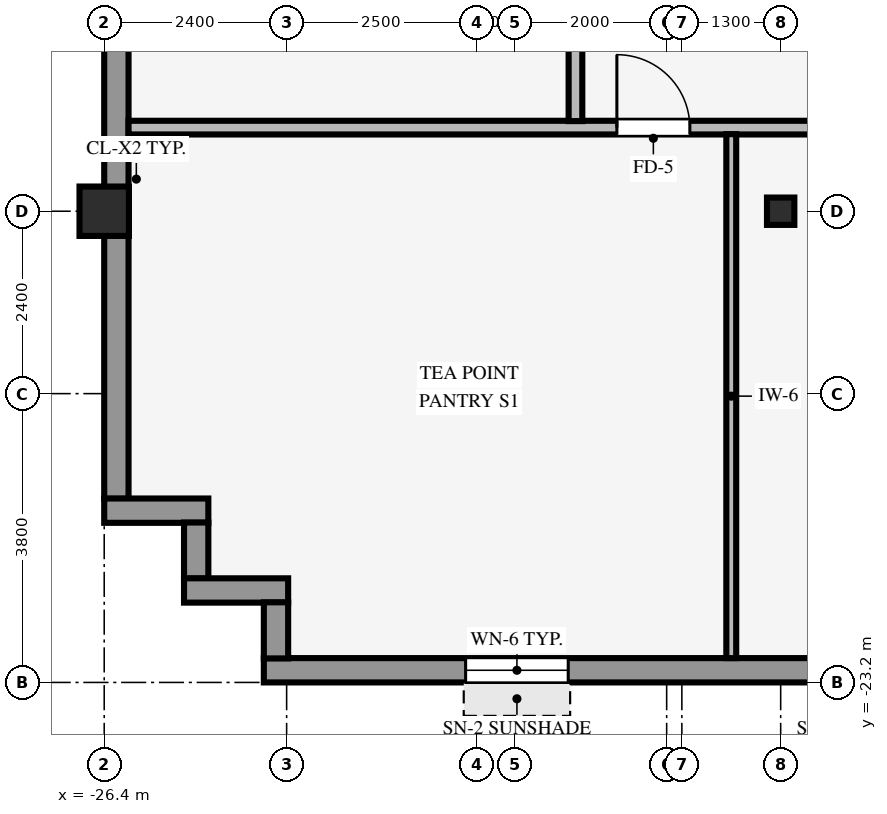
"""IFC4 building model, lengths in metres.
Left out: names, types, materials, properties, quantities, classifications, styles, units other than length and angle.
Written with IfcOpenShell. Run it as: python <this file> out.ifc"""

import sys

from ifc_helpers import new_model, si_unit, direction, frame, frame_2d, origin, origin_2d, place, context, subcontext, project, spatial, rectangle, hollow_rectangle, i_section, extrude, source, transform, mapped, element, fill, save


model = new_model("IFC4")
c1 = context("Model", 3, precision=1e-05, world=origin(), true_north=direction((0.0, 1.0)))
c2 = subcontext(c1, "Body", "Model", "MODEL_VIEW")
j1 = project(units=[si_unit("LENGTHUNIT", "METRE"), si_unit("PLANEANGLEUNIT", "RADIAN")], contexts=[c1])
p1 = place(None, origin())
s1 = spatial("IfcSite", under=j1, at=p1, CompositionType="ELEMENT")
p2 = place(p1, origin())
s2 = spatial("IfcBuilding", under=s1, at=p2, CompositionType="ELEMENT")
p3 = place(p2, frame((0.0, 0.0, 156.7)))
s3 = spatial("IfcBuildingStorey", under=s2, at=p3, CompositionType="ELEMENT", Elevation=156.7)
p4 = place(p3, frame((-26.4, -17.0, 0.0), z_axis=(0.0, 0.0, 1.0), x_axis=(1.0, 0.0, 0.0)))
e1 = element("IfcColumn", 1, at=p4, inside=s3, PredefinedType="COLUMN", context=c2, shape_type="SweptSolid", body=[
    extrude(hollow_rectangle(XDim=0.65, YDim=0.65, WallThickness=0.04, InnerFilletRadius=0.04, OuterFilletRadius=0.08, at=origin_2d()), origin(), (0.0, 0.0, 1.0), 3.37),
])
p5 = place(p3, frame((-17.5, -17.0, 0.0), z_axis=(0.0, 0.0, 1.0), x_axis=(1.0, 0.0, 0.0)))
e2 = element("IfcColumn", 2, at=p5, inside=s3, PredefinedType="COLUMN", context=c2, shape_type="SweptSolid", body=[
    extrude(i_section(OverallWidth=0.36, OverallDepth=0.36, WebThickness=0.021, FlangeThickness=0.021, FilletRadius=0.018, at=origin_2d()), origin(), (0.0, 0.0, 1.0), 3.37),
])
p6 = place(p3, frame((-24.3, -23.04, 0.0), z_axis=(0.0, 0.0, 1.0), x_axis=(1.0, 0.0, 0.0)))
e3 = element("IfcWall", 3, at=p6, inside=s3, PredefinedType="STANDARD", context=c2, shape_type="SweptSolid", body=[
    extrude(rectangle(XDim=48.6, YDim=0.32, at=frame_2d((24.3, 0.0))), origin(), (0.0, 0.0, 1.0), 2.705),
])
p7 = place(p6, frame((19.95, 0.0, 0.0), z_axis=(0.0, 0.0, 1.0), x_axis=(-1.0, 0.0, 0.0)))
e4 = element("IfcOpeningElement", 4, at=p7, cuts=e3, PredefinedType="OPENING", context=c2, shape_type="SweptSolid", body=[
    extrude(rectangle(XDim=1.05, YDim=2.1, at=frame_2d((0.525, 1.05))), frame((0.0, 0.17, 0.0), z_axis=(0.0, -1.0, 0.0), x_axis=(1.0, 0.0, 0.0)), (0.0, 0.0, 1.0), 0.34),
])
p8 = place(p6, frame((2.655, 0.0, 0.8)))
e5 = element("IfcOpeningElement", 5, at=p8, cuts=e3, PredefinedType="OPENING", context=c2, shape_type="SweptSolid", body=[
    extrude(rectangle(XDim=1.35, YDim=1.56, at=frame_2d((0.675, 0.78))), frame((0.0, 0.17, 0.0), z_axis=(0.0, -1.0, 0.0), x_axis=(1.0, 0.0, 0.0)), (0.0, 0.0, 1.0), 0.34),
])
p9 = place(p6, frame((7.315, 0.0, 0.8)))
e6 = element("IfcOpeningElement", 6, at=p9, cuts=e3, PredefinedType="OPENING", context=c2, shape_type="SweptSolid", body=[
    extrude(rectangle(XDim=1.35, YDim=1.56, at=frame_2d((0.675, 0.78))), frame((0.0, 0.17, 0.0), z_axis=(0.0, -1.0, 0.0), x_axis=(1.0, 0.0, 0.0)), (0.0, 0.0, 1.0), 0.34),
])
p10 = place(p6, frame((11.975, 0.0, 0.8)))
e7 = element("IfcOpeningElement", 7, at=p10, cuts=e3, PredefinedType="OPENING", context=c2, shape_type="SweptSolid", body=[
    extrude(rectangle(XDim=1.35, YDim=1.56, at=frame_2d((0.675, 0.78))), frame((0.0, 0.17, 0.0), z_axis=(0.0, -1.0, 0.0), x_axis=(1.0, 0.0, 0.0)), (0.0, 0.0, 1.0), 0.34),
])
p11 = place(p6, frame((21.295, 0.0, 0.8)))
e8 = element("IfcOpeningElement", 8, at=p11, cuts=e3, PredefinedType="OPENING", context=c2, shape_type="SweptSolid", body=[
    extrude(rectangle(XDim=1.35, YDim=1.56, at=frame_2d((0.675, 0.78))), frame((0.0, 0.17, 0.0), z_axis=(0.0, -1.0, 0.0), x_axis=(1.0, 0.0, 0.0)), (0.0, 0.0, 1.0), 0.34),
])
p12 = place(p6, frame((25.955, 0.0, 0.8)))
e9 = element("IfcOpeningElement", 9, at=p12, cuts=e3, PredefinedType="OPENING", context=c2, shape_type="SweptSolid", body=[
    extrude(rectangle(XDim=1.35, YDim=1.56, at=frame_2d((0.675, 0.78))), frame((0.0, 0.17, 0.0), z_axis=(0.0, -1.0, 0.0), x_axis=(1.0, 0.0, 0.0)), (0.0, 0.0, 1.0), 0.34),
])
p13 = place(p6, frame((31.065, 0.0, 0.8)))
e10 = element("IfcOpeningElement", 10, at=p13, cuts=e3, PredefinedType="OPENING", context=c2, shape_type="SweptSolid", body=[
    extrude(rectangle(XDim=1.35, YDim=1.56, at=frame_2d((0.675, 0.78))), frame((0.0, 0.17, 0.0), z_axis=(0.0, -1.0, 0.0), x_axis=(1.0, 0.0, 0.0)), (0.0, 0.0, 1.0), 0.34),
])
p14 = place(p6, frame((35.275, 0.0, 0.8)))
e11 = element("IfcOpeningElement", 11, at=p14, cuts=e3, PredefinedType="OPENING", context=c2, shape_type="SweptSolid", body=[
    extrude(rectangle(XDim=1.35, YDim=1.56, at=frame_2d((0.675, 0.78))), frame((0.0, 0.17, 0.0), z_axis=(0.0, -1.0, 0.0), x_axis=(1.0, 0.0, 0.0)), (0.0, 0.0, 1.0), 0.34),
])
p15 = place(p6, frame((39.935, 0.0, 0.8)))
e12 = element("IfcOpeningElement", 12, at=p15, cuts=e3, PredefinedType="OPENING", context=c2, shape_type="SweptSolid", body=[
    extrude(rectangle(XDim=1.35, YDim=1.56, at=frame_2d((0.675, 0.78))), frame((0.0, 0.17, 0.0), z_axis=(0.0, -1.0, 0.0), x_axis=(1.0, 0.0, 0.0)), (0.0, 0.0, 1.0), 0.34),
])
p16 = place(p6, frame((44.595, 0.0, 0.8)))
e13 = element("IfcOpeningElement", 13, at=p16, cuts=e3, PredefinedType="OPENING", context=c2, shape_type="SweptSolid", body=[
    extrude(rectangle(XDim=1.35, YDim=1.56, at=frame_2d((0.675, 0.78))), frame((0.0, 0.17, 0.0), z_axis=(0.0, -1.0, 0.0), x_axis=(1.0, 0.0, 0.0)), (0.0, 0.0, 1.0), 0.34),
])
p17 = place(p3, frame((-26.24, -20.784, 0.0), z_axis=(0.0, 0.0, 1.0), x_axis=(0.0, 1.0, 0.0)))
e14 = element("IfcWall", 14, at=p17, inside=s3, PredefinedType="STANDARD", context=c2, shape_type="SweptSolid", body=[
    extrude(rectangle(XDim=41.568, YDim=0.32, at=frame_2d((20.784, 0.0))), origin(), (0.0, 0.0, 1.0), 2.705),
])
p18 = place(p17, frame((7.369, 0.0, 0.8)))
e15 = element("IfcOpeningElement", 15, at=p18, cuts=e14, PredefinedType="OPENING", context=c2, shape_type="SweptSolid", body=[
    extrude(rectangle(XDim=2.1, YDim=1.56, at=frame_2d((1.05, 0.78))), frame((0.0, 0.17, 0.0), z_axis=(0.0, -1.0, 0.0), x_axis=(1.0, 0.0, 0.0)), (0.0, 0.0, 1.0), 0.34),
])
p19 = place(p17, frame((12.315, 0.0, 0.8)))
e16 = element("IfcOpeningElement", 16, at=p19, cuts=e14, PredefinedType="OPENING", context=c2, shape_type="SweptSolid", body=[
    extrude(rectangle(XDim=2.1, YDim=1.56, at=frame_2d((1.05, 0.78))), frame((0.0, 0.17, 0.0), z_axis=(0.0, -1.0, 0.0), x_axis=(1.0, 0.0, 0.0)), (0.0, 0.0, 1.0), 0.34),
])
p20 = place(p17, frame((17.261, 0.0, 0.8)))
e17 = element("IfcOpeningElement", 17, at=p20, cuts=e14, PredefinedType="OPENING", context=c2, shape_type="SweptSolid", body=[
    extrude(rectangle(XDim=2.1, YDim=1.56, at=frame_2d((1.05, 0.78))), frame((0.0, 0.17, 0.0), z_axis=(0.0, -1.0, 0.0), x_axis=(1.0, 0.0, 0.0)), (0.0, 0.0, 1.0), 0.34),
])
p21 = place(p17, frame((22.207, 0.0, 0.8)))
e18 = element("IfcOpeningElement", 18, at=p21, cuts=e14, PredefinedType="OPENING", context=c2, shape_type="SweptSolid", body=[
    extrude(rectangle(XDim=2.1, YDim=1.56, at=frame_2d((1.05, 0.78))), frame((0.0, 0.17, 0.0), z_axis=(0.0, -1.0, 0.0), x_axis=(1.0, 0.0, 0.0)), (0.0, 0.0, 1.0), 0.34),
])
p22 = place(p17, frame((27.153, 0.0, 0.8)))
e19 = element("IfcOpeningElement", 19, at=p22, cuts=e14, PredefinedType="OPENING", context=c2, shape_type="SweptSolid", body=[
    extrude(rectangle(XDim=2.1, YDim=1.56, at=frame_2d((1.05, 0.78))), frame((0.0, 0.17, 0.0), z_axis=(0.0, -1.0, 0.0), x_axis=(1.0, 0.0, 0.0)), (0.0, 0.0, 1.0), 0.34),
])
p23 = place(p17, frame((32.099, 0.0, 0.8)))
e20 = element("IfcOpeningElement", 20, at=p23, cuts=e14, PredefinedType="OPENING", context=c2, shape_type="SweptSolid", body=[
    extrude(rectangle(XDim=2.1, YDim=1.56, at=frame_2d((1.05, 0.78))), frame((0.0, 0.17, 0.0), z_axis=(0.0, -1.0, 0.0), x_axis=(1.0, 0.0, 0.0)), (0.0, 0.0, 1.0), 0.34),
])
p24 = place(p3, frame((-26.4, -20.94, 0.0), z_axis=(0.0, 0.0, 1.0), x_axis=(1.0, 0.0, 0.0)))
e21 = element("IfcWall", 21, at=p24, inside=s3, PredefinedType="STANDARD", context=c2, shape_type="SweptSolid", body=[
    extrude(rectangle(XDim=1.37, YDim=0.32, at=frame_2d((0.685, 0.0))), origin(), (0.0, 0.0, 1.0), 3.36),
])
p25 = place(p3, frame((-25.19, -21.834, 0.0), z_axis=(0.0, 0.0, 1.0), x_axis=(0.0, 1.0, 0.0)))
e22 = element("IfcWall", 22, at=p25, inside=s3, PredefinedType="STANDARD", context=c2, shape_type="SweptSolid", body=[
    extrude(rectangle(XDim=0.738, YDim=0.32, at=frame_2d((0.369, 0.0))), origin(), (0.0, 0.0, 1.0), 3.36),
])
p26 = place(p3, frame((-25.35, -21.99, 0.0), z_axis=(0.0, 0.0, 1.0), x_axis=(1.0, 0.0, 0.0)))
e23 = element("IfcWall", 23, at=p26, inside=s3, PredefinedType="STANDARD", context=c2, shape_type="SweptSolid", body=[
    extrude(rectangle(XDim=1.37, YDim=0.32, at=frame_2d((0.685, 0.0))), origin(), (0.0, 0.0, 1.0), 3.36),
])
p27 = place(p3, frame((-24.14, -22.884, 0.0), z_axis=(0.0, 0.0, 1.0), x_axis=(0.0, 1.0, 0.0)))
e24 = element("IfcWall", 24, at=p27, inside=s3, PredefinedType="STANDARD", context=c2, shape_type="SweptSolid", body=[
    extrude(rectangle(XDim=0.738, YDim=0.32, at=frame_2d((0.369, 0.0))), origin(), (0.0, 0.0, 1.0), 3.36),
])
p28 = place(p3, frame((-26.08, -15.9, 0.0), z_axis=(0.0, 0.0, 1.0), x_axis=(1.0, 0.0, 0.0)))
e25 = element("IfcWall", 25, at=p28, inside=s3, PredefinedType="PARTITIONING", context=c2, shape_type="SweptSolid", body=[
    extrude(rectangle(XDim=52.16, YDim=0.18, at=frame_2d((26.08, 0.0))), origin(), (0.0, 0.0, 1.0), 3.36),
])
p29 = place(p28, frame((24.5, 0.0, 0.0)))
e26 = element("IfcOpeningElement", 26, at=p29, cuts=e25, PredefinedType="OPENING", context=c2, shape_type="SweptSolid", body=[
    extrude(rectangle(XDim=0.96, YDim=2.1, at=frame_2d((0.48, 1.05))), frame((0.0, 0.1, 0.0), z_axis=(0.0, -1.0, 0.0), x_axis=(1.0, 0.0, 0.0)), (0.0, 0.0, 1.0), 0.2),
])
p30 = place(p28, frame((40.5, 0.0, 0.0)))
e27 = element("IfcOpeningElement", 27, at=p30, cuts=e25, PredefinedType="OPENING", context=c2, shape_type="SweptSolid", body=[
    extrude(rectangle(XDim=0.96, YDim=2.1, at=frame_2d((0.48, 1.05))), frame((0.0, 0.1, 0.0), z_axis=(0.0, -1.0, 0.0), x_axis=(1.0, 0.0, 0.0)), (0.0, 0.0, 1.0), 0.2),
])
p31 = place(p28, frame((13.16, 0.0, 0.0)))
e28 = element("IfcOpeningElement", 28, at=p31, cuts=e25, PredefinedType="OPENING", context=c2, shape_type="SweptSolid", body=[
    extrude(rectangle(XDim=0.96, YDim=2.1, at=frame_2d((0.48, 1.05))), frame((0.0, 0.1, 0.0), z_axis=(0.0, -1.0, 0.0), x_axis=(1.0, 0.0, 0.0)), (0.0, 0.0, 1.0), 0.2),
])
p32 = place(p28, frame((6.425, 0.0, 0.0)))
e29 = element("IfcOpeningElement", 29, at=p32, cuts=e25, PredefinedType="OPENING", context=c2, shape_type="SweptSolid", body=[
    extrude(rectangle(XDim=0.96, YDim=2.1, at=frame_2d((0.48, 1.05))), frame((0.0, 0.1, 0.0), z_axis=(0.0, -1.0, 0.0), x_axis=(1.0, 0.0, 0.0)), (0.0, 0.0, 1.0), 0.2),
])
p33 = place(p3, frame((-20.2, -15.814, 0.0), z_axis=(0.0, 0.0, 1.0), x_axis=(0.0, 1.0, 0.0)))
e30 = element("IfcWall", 30, at=p33, inside=s3, PredefinedType="PARTITIONING", context=c2, shape_type="SweptSolid", body=[
    extrude(rectangle(XDim=31.628, YDim=0.18, at=frame_2d((15.814, 0.0))), origin(), (0.0, 0.0, 1.0), 3.36),
])
p34 = place(p33, frame((15.334, 0.0, 0.0)))
e31 = element("IfcOpeningElement", 31, at=p34, cuts=e30, PredefinedType="OPENING", context=c2, shape_type="SweptSolid", body=[
    extrude(rectangle(XDim=0.96, YDim=2.1, at=frame_2d((0.48, 1.05))), frame((0.0, 0.1, 0.0), z_axis=(0.0, -1.0, 0.0), x_axis=(1.0, 0.0, 0.0)), (0.0, 0.0, 1.0), 0.2),
])
p35 = place(p33, frame((5.834, 0.0, 0.0)))
e32 = element("IfcOpeningElement", 32, at=p35, cuts=e30, PredefinedType="OPENING", context=c2, shape_type="SweptSolid", body=[
    extrude(rectangle(XDim=0.96, YDim=2.1, at=frame_2d((0.48, 1.05))), frame((0.0, 0.1, 0.0), z_axis=(0.0, -1.0, 0.0), x_axis=(1.0, 0.0, 0.0)), (0.0, 0.0, 1.0), 0.2),
])
p36 = place(p33, frame((24.834, 0.0, 0.0)))
e33 = element("IfcOpeningElement", 33, at=p36, cuts=e30, PredefinedType="OPENING", context=c2, shape_type="SweptSolid", body=[
    extrude(rectangle(XDim=0.96, YDim=2.1, at=frame_2d((0.48, 1.05))), frame((0.0, 0.1, 0.0), z_axis=(0.0, -1.0, 0.0), x_axis=(1.0, 0.0, 0.0)), (0.0, 0.0, 1.0), 0.2),
])
p37 = place(p3, frame((-18.15, -22.88, 0.0), z_axis=(0.0, 0.0, 1.0), x_axis=(0.0, 1.0, 0.0)))
e34 = element("IfcWall", 34, at=p37, inside=s3, PredefinedType="PARTITIONING", context=c2, shape_type="SweptSolid", body=[
    extrude(rectangle(XDim=6.894, YDim=0.13, at=frame_2d((3.447, 0.0))), origin(), (0.0, 0.0, 1.0), 3.36),
])
m1 = source(origin(), c2, "Body", "SweptSolid", [
    extrude(rectangle(XDim=1.35, YDim=1.56, at=frame_2d((0.675, 0.78))), frame((0.0, 0.03, 0.0), z_axis=(0.0, -1.0, 0.0), x_axis=(1.0, 0.0, 0.0)), (0.0, 0.0, 1.0), 0.06),
])
p38 = place(p8, origin())
e35 = element("IfcWindow", 35, at=p38, inside=s3, PartitioningType="SINGLE_PANEL", PredefinedType="WINDOW", context=c2, shape_type="MappedRepresentation", body=[
    mapped(m1, transform((0.0, 0.0, 0.0), scale=1.0)),
])
fill(e5, e35)
m2 = source(origin(), c2, "Body", "SweptSolid", [
    extrude(rectangle(XDim=0.96, YDim=2.1, at=frame_2d((0.48, 1.05))), frame((0.0, 0.025, 0.0), z_axis=(0.0, -1.0, 0.0), x_axis=(1.0, 0.0, 0.0)), (0.0, 0.0, 1.0), 0.05),
])
p39 = place(p32, origin())
e36 = element("IfcDoor", 36, at=p39, inside=s3, OperationType="SINGLE_SWING_LEFT", PredefinedType="DOOR", context=c2, shape_type="MappedRepresentation", body=[
    mapped(m2, transform((0.0, 0.0, 0.0), scale=1.0)),
])
fill(e29, e36)
save(model, sys.argv[1])
